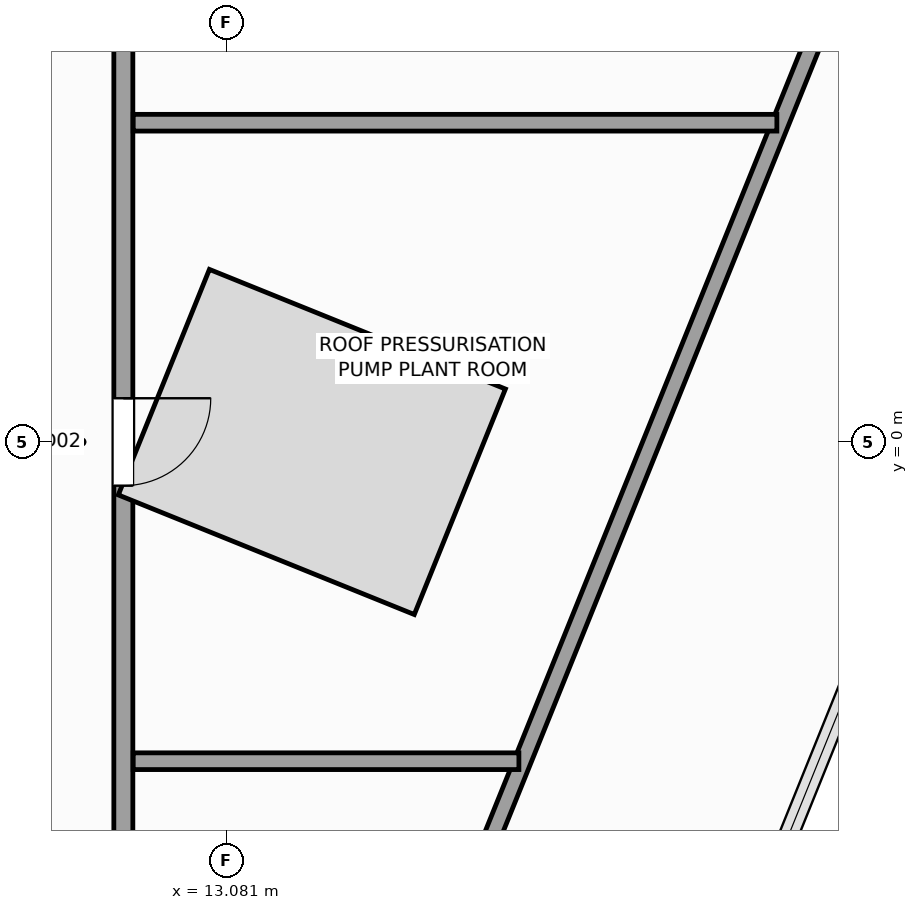
"""IFC4 building model, lengths in metres.
Left out: names, types, materials, properties, quantities, classifications, styles, units other than length and angle.
Written with IfcOpenShell. Run it as: python <this file> out.ifc"""

import sys

from ifc_helpers import new_model, si_unit, direction, frame, frame_2d, origin, place, context, subcontext, project, spatial, rectangle, extrude, source, transform, mapped, element, fill, save


model = new_model("IFC4")
c1 = context("Model", 3, precision=1e-05, world=origin(), true_north=direction((0.0, 1.0)))
c2 = subcontext(c1, "Body", "Model", "MODEL_VIEW")
j1 = project(units=[si_unit("LENGTHUNIT", "METRE"), si_unit("PLANEANGLEUNIT", "RADIAN")], contexts=[c1])
p1 = place(None, origin())
s1 = spatial("IfcSite", under=j1, at=p1, CompositionType="ELEMENT")
p2 = place(p1, origin())
s2 = spatial("IfcBuilding", under=s1, at=p2, CompositionType="ELEMENT")
p3 = place(p2, frame((0.0, 0.0, 341.6)))
s3 = spatial("IfcBuildingStorey", under=s2, at=p3, CompositionType="ELEMENT", Elevation=341.6)
p4 = place(p3, frame((11.172, -18.556, 0.0), z_axis=(0.0, 0.0, 1.0), x_axis=(0.374611707018, 0.927181788521, 0.0)))
e1 = element("IfcWall", 1, at=p4, inside=s3, PredefinedType="PARTITIONING", context=c2, shape_type="SweptSolid", body=[
    extrude(rectangle(XDim=26.04, YDim=0.22, at=frame_2d((13.02, 0.0))), origin(), (0.0, 0.0, 1.0), 3.0),
])
p5 = place(p3, frame((11.72, -11.62, 0.0), z_axis=(0.0, 0.0, 1.0), x_axis=(0.0, 1.0, 0.0)))
e2 = element("IfcWall", 2, at=p5, inside=s3, PredefinedType="PARTITIONING", context=c2, shape_type="SweptSolid", body=[
    extrude(rectangle(XDim=21.84, YDim=0.25, at=frame_2d((10.92, 0.0))), origin(), (0.0, 0.0, 1.0), 3.65),
])
p6 = place(p5, frame((11.045, 0.0, 0.0)))
e3 = element("IfcOpeningElement", 3, at=p6, cuts=e2, PredefinedType="OPENING", context=c2, shape_type="SweptSolid", body=[
    extrude(rectangle(XDim=1.15, YDim=2.25, at=frame_2d((0.575, 1.125))), frame((0.0, 0.135, 0.0), z_axis=(0.0, -1.0, 0.0), x_axis=(1.0, 0.0, 0.0)), (0.0, 0.0, 1.0), 0.27),
])
p7 = place(p3, frame((11.85, 4.2, 0.0), z_axis=(0.0, 0.0, 1.0), x_axis=(1.0, 0.0, 0.0)))
e4 = element("IfcWall", 4, at=p7, inside=s3, PredefinedType="PARTITIONING", context=c2, shape_type="SweptSolid", body=[
    extrude(rectangle(XDim=8.468, YDim=0.22, at=frame_2d((4.234, 0.0))), origin(), (0.0, 0.0, 1.0), 3.65),
])
p8 = place(p3, frame((11.85, -4.2, 0.0), z_axis=(0.0, 0.0, 1.0), x_axis=(1.0, 0.0, 0.0)))
e5 = element("IfcWall", 5, at=p8, inside=s3, PredefinedType="PARTITIONING", context=c2, shape_type="SweptSolid", body=[
    extrude(rectangle(XDim=5.074, YDim=0.22, at=frame_2d((2.537, 0.0))), origin(), (0.0, 0.0, 1.0), 3.65),
])
m1 = source(origin(), c2, "Body", "SweptSolid", [
    extrude(rectangle(XDim=1.15, YDim=2.25, at=frame_2d((0.575, 1.125))), frame((0.0, 0.025, 0.0), z_axis=(0.0, -1.0, 0.0), x_axis=(1.0, 0.0, 0.0)), (0.0, 0.0, 1.0), 0.05),
])
p9 = place(p6, frame((1.15, 0.0, 0.0), z_axis=(0.0, 0.0, 1.0), x_axis=(-1.0, 0.0, 0.0)))
e6 = element("IfcDoor", 6, at=p9, inside=s3, OperationType="SINGLE_SWING_RIGHT", PredefinedType="DOOR", context=c2, shape_type="MappedRepresentation", body=[
    mapped(m1, transform((0.0, 0.0, 0.0), scale=1.0)),
])
fill(e3, e6)
save(model, sys.argv[1])
